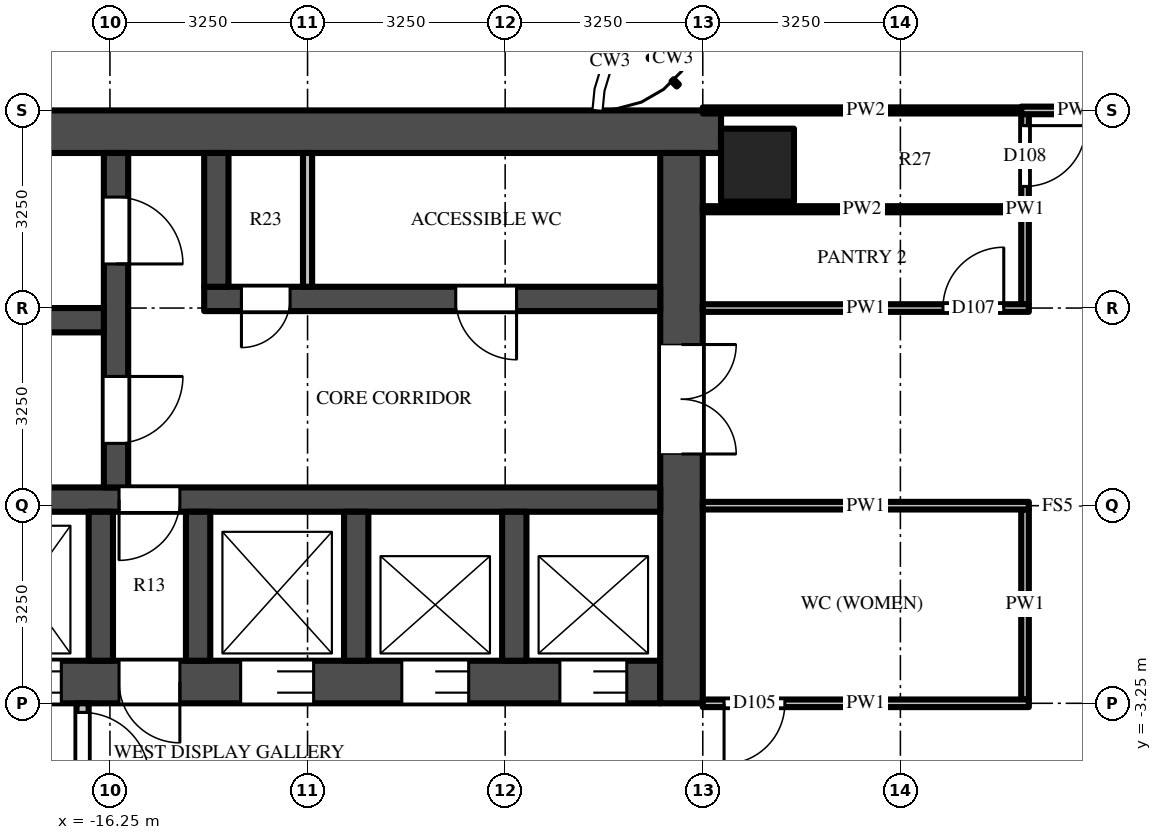
"""IFC4 building model, lengths in metres.
Left out: names, types, materials, properties, quantities, classifications, styles, units other than length and angle.
Written with IfcOpenShell. Run it as: python <this file> out.ifc"""

import sys

from ifc_helpers import new_model, si_unit, direction, frame, frame_2d, origin, origin_2d, place, context, subcontext, project, spatial, rectangle, extrude, source, transform, mapped, element, fill, save


model = new_model("IFC4")
c1 = context("Model", 3, precision=1e-05, world=origin(), true_north=direction((0.0, 1.0)))
c2 = subcontext(c1, "Body", "Model", "MODEL_VIEW")
j1 = project(units=[si_unit("LENGTHUNIT", "METRE"), si_unit("PLANEANGLEUNIT", "RADIAN")], contexts=[c1])
p1 = place(None, origin())
s1 = spatial("IfcSite", under=j1, at=p1, CompositionType="ELEMENT")
p2 = place(p1, origin())
s2 = spatial("IfcBuilding", under=s1, at=p2, CompositionType="ELEMENT")
p3 = place(p2, frame((0.0, 0.0, 165.9)))
s3 = spatial("IfcBuildingStorey", under=s2, at=p3, CompositionType="ELEMENT", Elevation=165.9)
m1 = source(origin(), c2, "Body", "SweptSolid", [
    extrude(rectangle(XDim=1.2, YDim=1.2, at=origin_2d()), origin(), (0.0, 0.0, 1.0), 3.9),
])
p4 = place(p3, frame((-5.6, 5.6, 0.0), z_axis=(0.0, 0.0, 1.0), x_axis=(1.0, 0.0, 0.0)))
e1 = element("IfcColumn", 1, at=p4, inside=s3, PredefinedType="COLUMN", context=c2, shape_type="MappedRepresentation", body=[
    mapped(m1, transform((0.0, 0.0, 0.0))),
])
m2 = source(origin(), c2, "Body", "SweptSolid", [
    extrude(rectangle(XDim=16.55, YDim=0.7, at=frame_2d((8.275, 0.0))), origin(), (0.0, 0.0, 1.0), 3.7),
])
p5 = place(p3, frame((-6.2, 6.15, 0.0), z_axis=(0.0, 0.0, 1.0), x_axis=(-1.0, 0.0, 0.0)))
e2 = element("IfcWall", 2, at=p5, inside=s3, PredefinedType="SHEAR", context=c2, shape_type="MappedRepresentation", body=[
    mapped(m2, transform((0.0, 0.0, 0.0))),
])
m3 = source(origin(), c2, "Body", "SweptSolid", [
    extrude(rectangle(XDim=14.85, YDim=0.7, at=frame_2d((7.425, 0.0))), origin(), (0.0, 0.0, 1.0), 3.7),
])
p6 = place(p3, frame((-7.2, -2.9, 0.0), z_axis=(0.0, 0.0, 1.0), x_axis=(-1.0, 0.0, 0.0)))
e3 = element("IfcWall", 3, at=p6, inside=s3, PredefinedType="SHEAR", context=c2, shape_type="MappedRepresentation", body=[
    mapped(m3, transform((0.0, 0.0, 0.0))),
])
m4 = source(origin(), c2, "Body", "SweptSolid", [
    extrude(rectangle(XDim=1.1, YDim=2.1, at=frame_2d((0.55, 1.05))), frame((0.0, 0.36, 0.0), z_axis=(0.0, -1.0, 0.0), x_axis=(1.0, 0.0, 0.0)), (0.0, 0.0, 1.0), 0.72),
])
p7 = place(p6, frame((0.55, 0.0, 0.0)))
e4 = element("IfcOpeningElement", 4, at=p7, cuts=e3, PredefinedType="OPENING", context=c2, shape_type="MappedRepresentation", body=[
    mapped(m4, transform((0.0, 0.0, 0.0))),
])
p8 = place(p6, frame((3.15, 0.0, 0.0)))
e5 = element("IfcOpeningElement", 5, at=p8, cuts=e3, PredefinedType="OPENING", context=c2, shape_type="MappedRepresentation", body=[
    mapped(m4, transform((0.0, 0.0, 0.0))),
])
m5 = source(origin(), c2, "Body", "SweptSolid", [
    extrude(rectangle(XDim=1.2, YDim=2.1, at=frame_2d((0.6, 1.05))), frame((0.0, 0.36, 0.0), z_axis=(0.0, -1.0, 0.0), x_axis=(1.0, 0.0, 0.0)), (0.0, 0.0, 1.0), 0.72),
])
p9 = place(p6, frame((5.7, 0.0, 0.0)))
e6 = element("IfcOpeningElement", 6, at=p9, cuts=e3, PredefinedType="OPENING", context=c2, shape_type="MappedRepresentation", body=[
    mapped(m5, transform((0.0, 0.0, 0.0))),
])
m6 = source(origin(), c2, "Body", "SweptSolid", [
    extrude(rectangle(XDim=1.3, YDim=2.1, at=frame_2d((0.65, 1.05))), frame((0.0, 0.36, 0.0), z_axis=(0.0, -1.0, 0.0), x_axis=(1.0, 0.0, 0.0)), (0.0, 0.0, 1.0), 0.72),
])
p10 = place(p6, frame((12.2, 0.0, 0.0)))
e7 = element("IfcOpeningElement", 7, at=p10, cuts=e3, PredefinedType="OPENING", context=c2, shape_type="MappedRepresentation", body=[
    mapped(m6, transform((0.0, 0.0, 0.0))),
])
p11 = place(p6, frame((9.85, 0.0, 0.0)))
e8 = element("IfcOpeningElement", 8, at=p11, cuts=e3, PredefinedType="OPENING", context=c2, shape_type="MappedRepresentation", body=[
    mapped(m5, transform((0.0, 0.0, 0.0))),
])
m7 = source(origin(), c2, "Body", "SweptSolid", [
    extrude(rectangle(XDim=1.0, YDim=2.1, at=frame_2d((0.5, 1.05))), frame((0.0, 0.36, 0.0), z_axis=(0.0, -1.0, 0.0), x_axis=(1.0, 0.0, 0.0)), (0.0, 0.0, 1.0), 0.72),
])
p12 = place(p6, frame((7.9, 0.0, 0.0)))
e9 = element("IfcOpeningElement", 9, at=p12, cuts=e3, PredefinedType="OPENING", context=c2, shape_type="MappedRepresentation", body=[
    mapped(m7, transform((0.0, 0.0, 0.0))),
])
m8 = source(origin(), c2, "Body", "SweptSolid", [
    extrude(rectangle(XDim=9.05, YDim=0.7, at=frame_2d((4.525, 0.0))), origin(), (0.0, 0.0, 1.0), 3.7),
])
p13 = place(p3, frame((-6.85, 5.8, 0.0), z_axis=(0.0, 0.0, 1.0), x_axis=(0.0, -1.0, 0.0)))
e10 = element("IfcWall", 10, at=p13, inside=s3, PredefinedType="SHEAR", context=c2, shape_type="MappedRepresentation", body=[
    mapped(m8, transform((0.0, 0.0, 0.0))),
])
m9 = source(origin(), c2, "Body", "SweptSolid", [
    extrude(rectangle(XDim=1.8, YDim=2.1, at=frame_2d((0.9, 1.05))), frame((0.0, 0.36, 0.0), z_axis=(0.0, -1.0, 0.0), x_axis=(1.0, 0.0, 0.0)), (0.0, 0.0, 1.0), 0.72),
])
p14 = place(p13, frame((3.15, 0.0, 0.0)))
e11 = element("IfcOpeningElement", 11, at=p14, cuts=e10, PredefinedType="OPENING", context=c2, shape_type="MappedRepresentation", body=[
    mapped(m9, transform((0.0, 0.0, 0.0))),
])
m10 = source(origin(), c2, "Body", "SweptSolid", [
    extrude(rectangle(XDim=7.5, YDim=0.4, at=frame_2d((3.75, 0.0))), origin(), (0.0, 0.0, 1.0), 3.7),
])
p15 = place(p3, frame((-7.2, 3.4, 0.0), z_axis=(0.0, 0.0, 1.0), x_axis=(-1.0, 0.0, 0.0)))
e12 = element("IfcWall", 12, at=p15, inside=s3, PredefinedType="SHEAR", context=c2, shape_type="MappedRepresentation", body=[
    mapped(m10, transform((0.0, 0.0, 0.0))),
])
m11 = source(origin(), c2, "Body", "SweptSolid", [
    extrude(rectangle(XDim=1.0, YDim=2.1, at=frame_2d((0.5, 1.05))), frame((0.0, 0.21, 0.0), z_axis=(0.0, -1.0, 0.0), x_axis=(1.0, 0.0, 0.0)), (0.0, 0.0, 1.0), 0.42),
])
p16 = place(p15, frame((2.363, 0.0, 0.0)))
e13 = element("IfcOpeningElement", 13, at=p16, cuts=e12, PredefinedType="OPENING", context=c2, shape_type="MappedRepresentation", body=[
    mapped(m11, transform((0.0, 0.0, 0.0))),
])
m12 = source(origin(), c2, "Body", "SweptSolid", [
    extrude(rectangle(XDim=0.8, YDim=2.1, at=frame_2d((0.4, 1.05))), frame((0.0, 0.21, 0.0), z_axis=(0.0, -1.0, 0.0), x_axis=(1.0, 0.0, 0.0)), (0.0, 0.0, 1.0), 0.42),
])
p17 = place(p15, frame((6.087, 0.0, 0.0)))
e14 = element("IfcOpeningElement", 14, at=p17, cuts=e12, PredefinedType="OPENING", context=c2, shape_type="MappedRepresentation", body=[
    mapped(m12, transform((0.0, 0.0, 0.0))),
])
m13 = source(origin(), c2, "Body", "SweptSolid", [
    extrude(rectangle(XDim=14.85, YDim=0.4, at=frame_2d((7.425, 0.0))), origin(), (0.0, 0.0, 1.0), 3.7),
])
p18 = place(p3, frame((-7.2, 0.1, 0.0), z_axis=(0.0, 0.0, 1.0), x_axis=(-1.0, 0.0, 0.0)))
e15 = element("IfcWall", 15, at=p18, inside=s3, PredefinedType="SHEAR", context=c2, shape_type="MappedRepresentation", body=[
    mapped(m13, transform((0.0, 0.0, 0.0))),
])
p19 = place(p18, frame((7.9, 0.0, 0.0)))
e16 = element("IfcOpeningElement", 16, at=p19, cuts=e15, PredefinedType="OPENING", context=c2, shape_type="MappedRepresentation", body=[
    mapped(m11, transform((0.0, 0.0, 0.0))),
])
m14 = source(origin(), c2, "Body", "SweptSolid", [
    extrude(rectangle(XDim=5.5, YDim=0.4, at=frame_2d((2.75, 0.0))), origin(), (0.0, 0.0, 1.0), 3.7),
])
p20 = place(p3, frame((-16.15, 5.8, 0.0), z_axis=(0.0, 0.0, 1.0), x_axis=(0.0, -1.0, 0.0)))
e17 = element("IfcWall", 17, at=p20, inside=s3, PredefinedType="SHEAR", context=c2, shape_type="MappedRepresentation", body=[
    mapped(m14, transform((0.0, 0.0, 0.0))),
])
m15 = source(origin(), c2, "Body", "SweptSolid", [
    extrude(rectangle(XDim=1.1, YDim=2.1, at=frame_2d((0.55, 1.05))), frame((0.0, 0.21, 0.0), z_axis=(0.0, -1.0, 0.0), x_axis=(1.0, 0.0, 0.0)), (0.0, 0.0, 1.0), 0.42),
])
p21 = place(p20, frame((0.725, 0.0, 0.0)))
e18 = element("IfcOpeningElement", 18, at=p21, cuts=e17, PredefinedType="OPENING", context=c2, shape_type="MappedRepresentation", body=[
    mapped(m15, transform((0.0, 0.0, 0.0))),
])
p22 = place(p20, frame((3.675, 0.0, 0.0)))
e19 = element("IfcOpeningElement", 19, at=p22, cuts=e17, PredefinedType="OPENING", context=c2, shape_type="MappedRepresentation", body=[
    mapped(m15, transform((0.0, 0.0, 0.0))),
])
m16 = source(origin(), c2, "Body", "SweptSolid", [
    extrude(rectangle(XDim=5.7, YDim=0.4, at=frame_2d((2.85, 0.0))), origin(), (0.0, 0.0, 1.0), 3.7),
])
p23 = place(p3, frame((-16.35, 3.05, 0.0), z_axis=(0.0, 0.0, 1.0), x_axis=(-1.0, 0.0, 0.0)))
e20 = element("IfcWall", 20, at=p23, inside=s3, PredefinedType="SHEAR", context=c2, shape_type="MappedRepresentation", body=[
    mapped(m16, transform((0.0, 0.0, 0.0))),
])
m17 = source(origin(), c2, "Body", "SweptSolid", [
    extrude(rectangle(XDim=2.2, YDim=0.4, at=frame_2d((1.1, 0.0))), origin(), (0.0, 0.0, 1.0), 3.7),
])
p24 = place(p3, frame((-14.5, 5.8, 0.0), z_axis=(0.0, 0.0, 1.0), x_axis=(0.0, -1.0, 0.0)))
e21 = element("IfcWall", 21, at=p24, inside=s3, PredefinedType="SHEAR", context=c2, shape_type="MappedRepresentation", body=[
    mapped(m17, transform((0.0, 0.0, 0.0))),
])
m18 = source(origin(), c2, "Body", "SweptSolid", [
    extrude(rectangle(XDim=2.45, YDim=0.4, at=frame_2d((1.225, 0.0))), origin(), (0.0, 0.0, 1.0), 3.7),
])
for number, where, z_axis, x_axis in (
    (22, (-9.6, -0.1, 0.0), (0.0, 0.0, 1.0), (0.0, -1.0, 0.0)),
    (23, (-12.2, -0.1, 0.0), (0.0, 0.0, 1.0), (0.0, -1.0, 0.0)),
    (24, (-14.8, -0.1, 0.0), (0.0, 0.0, 1.0), (0.0, -1.0, 0.0)),
    (25, (-16.4, -0.1, 0.0), (0.0, 0.0, 1.0), (0.0, -1.0, 0.0)),
):
    element("IfcWall", number, at=place(p3, frame(where, z_axis=z_axis, x_axis=x_axis)), inside=s3, PredefinedType="SHEAR", context=c2, shape_type="MappedRepresentation", body=[
        mapped(m18, transform((0.0, 0.0, 0.0))),
    ])
m19 = source(origin(), c2, "Body", "SweptSolid", [
    extrude(rectangle(XDim=3.25, YDim=0.2, at=frame_2d((1.625, 0.0))), origin(), (0.0, 0.0, 1.0), 3.7),
])
p25 = place(p3, frame((-16.7, -3.25, 0.0), z_axis=(0.0, 0.0, 1.0), x_axis=(0.0, -1.0, 0.0)))
e26 = element("IfcWall", 26, at=p25, inside=s3, PredefinedType="PARTITIONING", context=c2, shape_type="MappedRepresentation", body=[
    mapped(m19, transform((0.0, 0.0, 0.0))),
])
m20 = source(origin(), c2, "Body", "SweptSolid", [
    extrude(rectangle(XDim=1.1, YDim=2.1, at=frame_2d((0.55, 1.05))), frame((0.0, 0.11, 0.0), z_axis=(0.0, -1.0, 0.0), x_axis=(1.0, 0.0, 0.0)), (0.0, 0.0, 1.0), 0.22),
])
p26 = place(p25, frame((0.15, 0.0, 0.0)))
e27 = element("IfcOpeningElement", 27, at=p26, cuts=e26, PredefinedType="OPENING", context=c2, shape_type="MappedRepresentation", body=[
    mapped(m20, transform((0.0, 0.0, 0.0))),
])
m21 = source(origin(), c2, "Body", "SweptSolid", [
    extrude(rectangle(XDim=2.2, YDim=0.15, at=frame_2d((1.1, 0.0))), origin(), (0.0, 0.0, 1.0), 3.7),
])
p27 = place(p3, frame((-13.0, 5.8, 0.0), z_axis=(0.0, 0.0, 1.0), x_axis=(0.0, -1.0, 0.0)))
e28 = element("IfcWall", 28, at=p27, inside=s3, PredefinedType="PARTITIONING", context=c2, shape_type="MappedRepresentation", body=[
    mapped(m21, transform((0.0, 0.0, 0.0))),
])
m22 = source(origin(), c2, "Body", "SweptSolid", [
    extrude(rectangle(XDim=3.125, YDim=0.125, at=frame_2d((1.562, 0.0))), origin(), (0.0, 0.0, 1.0), 3.068),
])
p28 = place(p3, frame((-1.2, -0.062, 0.0), z_axis=(0.0, 0.0, 1.0), x_axis=(0.0, -1.0, 0.0)))
e29 = element("IfcWall", 29, at=p28, inside=s3, PredefinedType="PARTITIONING", context=c2, shape_type="MappedRepresentation", body=[
    mapped(m22, transform((0.0, 0.0, 0.0))),
])
m23 = source(origin(), c2, "Body", "SweptSolid", [
    extrude(rectangle(XDim=3.137, YDim=0.125, at=frame_2d((1.569, 0.0))), origin(), (0.0, 0.0, 1.0), 2.997),
])
p29 = place(p3, frame((-1.2, 6.45, 0.0), z_axis=(0.0, 0.0, 1.0), x_axis=(0.0, -1.0, 0.0)))
e30 = element("IfcWall", 30, at=p29, inside=s3, PredefinedType="PARTITIONING", context=c2, shape_type="MappedRepresentation", body=[
    mapped(m23, transform((0.0, 0.0, 0.0))),
])
m24 = source(origin(), c2, "Body", "SweptSolid", [
    extrude(rectangle(XDim=1.0, YDim=2.1, at=frame_2d((0.5, 1.05))), frame((0.0, 0.073, 0.0), z_axis=(0.0, -1.0, 0.0), x_axis=(1.0, 0.0, 0.0)), (0.0, 0.0, 1.0), 0.145),
])
p30 = place(p29, frame((0.2, 0.0, 0.0)))
e31 = element("IfcOpeningElement", 31, at=p30, cuts=e30, PredefinedType="OPENING", context=c2, shape_type="MappedRepresentation", body=[
    mapped(m24, transform((0.0, 0.0, 0.0))),
])
m25 = source(origin(), c2, "Body", "SweptSolid", [
    extrude(rectangle(XDim=5.363, YDim=0.125, at=frame_2d((2.681, 0.0))), origin(), (0.0, 0.0, 1.0), 2.997),
])
p31 = place(p3, frame((-1.137, -3.25, 0.0), z_axis=(0.0, 0.0, 1.0), x_axis=(-1.0, 0.0, 0.0)))
e32 = element("IfcWall", 32, at=p31, inside=s3, PredefinedType="PARTITIONING", context=c2, shape_type="MappedRepresentation", body=[
    mapped(m25, transform((0.0, 0.0, 0.0))),
])
p32 = place(p31, frame((4.012, 0.0, 0.0)))
e33 = element("IfcOpeningElement", 33, at=p32, cuts=e32, PredefinedType="OPENING", context=c2, shape_type="MappedRepresentation", body=[
    mapped(m24, transform((0.0, 0.0, 0.0))),
])
p33 = place(p3, frame((-1.137, 0.0, 0.0), z_axis=(0.0, 0.0, 1.0), x_axis=(-1.0, 0.0, 0.0)))
e34 = element("IfcWall", 34, at=p33, inside=s3, PredefinedType="PARTITIONING", context=c2, shape_type="MappedRepresentation", body=[
    mapped(m25, transform((0.0, 0.0, 0.0))),
])
p34 = place(p3, frame((-6.5, 3.25, 0.0), z_axis=(0.0, 0.0, 1.0), x_axis=(1.0, 0.0, 0.0)))
e35 = element("IfcWall", 35, at=p34, inside=s3, PredefinedType="PARTITIONING", context=c2, shape_type="MappedRepresentation", body=[
    mapped(m25, transform((0.0, 0.0, 0.0))),
])
p35 = place(p34, frame((3.95, 0.0, 0.0)))
e36 = element("IfcOpeningElement", 36, at=p35, cuts=e35, PredefinedType="OPENING", context=c2, shape_type="MappedRepresentation", body=[
    mapped(m24, transform((0.0, 0.0, 0.0))),
])
m26 = source(origin(), c2, "Body", "SweptSolid", [
    extrude(rectangle(XDim=5.238, YDim=0.1, at=frame_2d((2.619, 0.0))), origin(), (0.0, 0.0, 1.0), 2.997),
])
p36 = place(p3, frame((-6.5, 4.875, 0.0), z_axis=(0.0, 0.0, 1.0), x_axis=(1.0, 0.0, 0.0)))
e37 = element("IfcWall", 37, at=p36, inside=s3, PredefinedType="PARTITIONING", context=c2, shape_type="MappedRepresentation", body=[
    mapped(m26, transform((0.0, 0.0, 0.0))),
])
m27 = source(origin(), c2, "Body", "SweptSolid", [
    extrude(rectangle(XDim=5.363, YDim=0.1, at=frame_2d((2.681, 0.0))), origin(), (0.0, 0.0, 1.0), 2.78),
])
p37 = place(p3, frame((-6.5, 6.5, 0.0), z_axis=(0.0, 0.0, 1.0), x_axis=(1.0, 0.0, 0.0)))
e38 = element("IfcWall", 38, at=p37, inside=s3, PredefinedType="PARTITIONING", context=c2, shape_type="MappedRepresentation", body=[
    mapped(m27, transform((0.0, 0.0, 0.0))),
])
m28 = source(origin(), c2, "Body", "SweptSolid", [
    extrude(rectangle(XDim=1.825, YDim=0.125, at=frame_2d((0.913, 0.0))), origin(), (0.0, 0.0, 1.0), 3.7),
])
p38 = place(p3, frame((-1.262, 6.5, 0.0), z_axis=(0.0, 0.0, 1.0), x_axis=(1.0, 0.0, 0.0)))
e39 = element("IfcWall", 39, at=p38, inside=s3, PredefinedType="PARTITIONING", context=c2, shape_type="MappedRepresentation", body=[
    mapped(m28, transform((0.0, 0.0, 0.0))),
])
m29 = source(origin(), c2, "Body", "SweptSolid", [
    extrude(rectangle(XDim=1.1, YDim=2.1, at=frame_2d((0.55, 1.05))), frame((0.0, -0.275, 0.0), z_axis=(0.0, -1.0, 0.0), x_axis=(1.0, 0.0, 0.0)), (0.0, 0.0, 1.0), 0.05),
])
p39 = place(p7, origin())
e40 = element("IfcDoor", 40, at=p39, inside=s3, OperationType="DOUBLE_DOOR_SLIDING", PredefinedType="DOOR", context=c2, shape_type="MappedRepresentation", body=[
    mapped(m29, transform((0.0, 0.0, 0.0))),
])
fill(e4, e40)
p40 = place(p8, origin())
e41 = element("IfcDoor", 41, at=p40, inside=s3, OperationType="DOUBLE_DOOR_SLIDING", PredefinedType="DOOR", context=c2, shape_type="MappedRepresentation", body=[
    mapped(m29, transform((0.0, 0.0, 0.0))),
])
fill(e5, e41)
m30 = source(origin(), c2, "Body", "SweptSolid", [
    extrude(rectangle(XDim=1.2, YDim=2.1, at=frame_2d((0.6, 1.05))), frame((0.0, -0.275, 0.0), z_axis=(0.0, -1.0, 0.0), x_axis=(1.0, 0.0, 0.0)), (0.0, 0.0, 1.0), 0.05),
])
p41 = place(p9, origin())
e42 = element("IfcDoor", 42, at=p41, inside=s3, OperationType="DOUBLE_DOOR_SLIDING", PredefinedType="DOOR", context=c2, shape_type="MappedRepresentation", body=[
    mapped(m30, transform((0.0, 0.0, 0.0))),
])
fill(e6, e42)
p42 = place(p11, origin())
e43 = element("IfcDoor", 43, at=p42, inside=s3, OperationType="DOUBLE_DOOR_SLIDING", PredefinedType="DOOR", context=c2, shape_type="MappedRepresentation", body=[
    mapped(m30, transform((0.0, 0.0, 0.0))),
])
fill(e8, e43)
m31 = source(origin(), c2, "Body", "SweptSolid", [
    extrude(rectangle(XDim=1.8, YDim=2.1, at=frame_2d((0.9, 1.05))), frame((0.0, -0.275, 0.0), z_axis=(0.0, -1.0, 0.0), x_axis=(1.0, 0.0, 0.0)), (0.0, 0.0, 1.0), 0.05),
])
p43 = place(p14, origin())
e44 = element("IfcDoor", 44, at=p43, inside=s3, OperationType="DOUBLE_DOOR_SINGLE_SWING", PredefinedType="DOOR", context=c2, shape_type="MappedRepresentation", body=[
    mapped(m31, transform((0.0, 0.0, 0.0))),
])
fill(e11, e44)
m32 = source(origin(), c2, "Body", "SweptSolid", [
    extrude(rectangle(XDim=1.1, YDim=2.1, at=frame_2d((0.55, 1.05))), frame((0.0, 0.025, 0.0), z_axis=(0.0, -1.0, 0.0), x_axis=(1.0, 0.0, 0.0)), (0.0, 0.0, 1.0), 0.05),
])
p44 = place(p21, origin())
e45 = element("IfcDoor", 45, at=p44, inside=s3, OperationType="SINGLE_SWING_RIGHT", PredefinedType="DOOR", context=c2, shape_type="MappedRepresentation", body=[
    mapped(m32, transform((0.0, 0.0, 0.0))),
])
fill(e18, e45)
p45 = place(p22, origin())
e46 = element("IfcDoor", 46, at=p45, inside=s3, OperationType="SINGLE_SWING_LEFT", PredefinedType="DOOR", context=c2, shape_type="MappedRepresentation", body=[
    mapped(m32, transform((0.0, 0.0, 0.0))),
])
fill(e19, e46)
m33 = source(origin(), c2, "Body", "SweptSolid", [
    extrude(rectangle(XDim=1.0, YDim=2.1, at=frame_2d((0.5, 1.05))), frame((0.0, 0.025, 0.0), z_axis=(0.0, -1.0, 0.0), x_axis=(1.0, 0.0, 0.0)), (0.0, 0.0, 1.0), 0.05),
])
p46 = place(p19, origin())
e47 = element("IfcDoor", 47, at=p46, inside=s3, OperationType="SINGLE_SWING_RIGHT", PredefinedType="DOOR", context=c2, shape_type="MappedRepresentation", body=[
    mapped(m33, transform((0.0, 0.0, 0.0))),
])
fill(e16, e47)
m34 = source(origin(), c2, "Body", "SweptSolid", [
    extrude(rectangle(XDim=1.0, YDim=2.1, at=frame_2d((0.5, 1.05))), frame((0.0, -0.275, 0.0), z_axis=(0.0, -1.0, 0.0), x_axis=(1.0, 0.0, 0.0)), (0.0, 0.0, 1.0), 0.05),
])
p47 = place(p12, origin())
e48 = element("IfcDoor", 48, at=p47, inside=s3, OperationType="SINGLE_SWING_LEFT", PredefinedType="DOOR", context=c2, shape_type="MappedRepresentation", body=[
    mapped(m34, transform((0.0, 0.0, 0.0))),
])
fill(e9, e48)
p48 = place(p26, origin())
e49 = element("IfcDoor", 49, at=p48, inside=s3, OperationType="SINGLE_SWING_RIGHT", PredefinedType="DOOR", context=c2, shape_type="MappedRepresentation", body=[
    mapped(m32, transform((0.0, 0.0, 0.0))),
])
fill(e27, e49)
p49 = place(p16, origin())
e50 = element("IfcDoor", 50, at=p49, inside=s3, OperationType="SINGLE_SWING_LEFT", PredefinedType="DOOR", context=c2, shape_type="MappedRepresentation", body=[
    mapped(m33, transform((0.0, 0.0, 0.0))),
])
fill(e13, e50)
m35 = source(origin(), c2, "Body", "SweptSolid", [
    extrude(rectangle(XDim=0.8, YDim=2.1, at=frame_2d((0.4, 1.05))), frame((0.0, 0.025, 0.0), z_axis=(0.0, -1.0, 0.0), x_axis=(1.0, 0.0, 0.0)), (0.0, 0.0, 1.0), 0.05),
])
p50 = place(p17, origin())
e51 = element("IfcDoor", 51, at=p50, inside=s3, OperationType="SINGLE_SWING_RIGHT", PredefinedType="DOOR", context=c2, shape_type="MappedRepresentation", body=[
    mapped(m35, transform((0.0, 0.0, 0.0))),
])
fill(e14, e51)
p51 = place(p32, origin())
e52 = element("IfcDoor", 52, at=p51, inside=s3, OperationType="SINGLE_SWING_RIGHT", PredefinedType="DOOR", context=c2, shape_type="MappedRepresentation", body=[
    mapped(m33, transform((0.0, 0.0, 0.0))),
])
fill(e33, e52)
p52 = place(p35, origin())
e53 = element("IfcDoor", 53, at=p52, inside=s3, OperationType="SINGLE_SWING_RIGHT", PredefinedType="DOOR", context=c2, shape_type="MappedRepresentation", body=[
    mapped(m33, transform((0.0, 0.0, 0.0))),
])
fill(e36, e53)
p53 = place(p30, origin())
e54 = element("IfcDoor", 54, at=p53, inside=s3, OperationType="SINGLE_SWING_LEFT", PredefinedType="DOOR", context=c2, shape_type="MappedRepresentation", body=[
    mapped(m33, transform((0.0, 0.0, 0.0))),
])
fill(e31, e54)
save(model, sys.argv[1])
